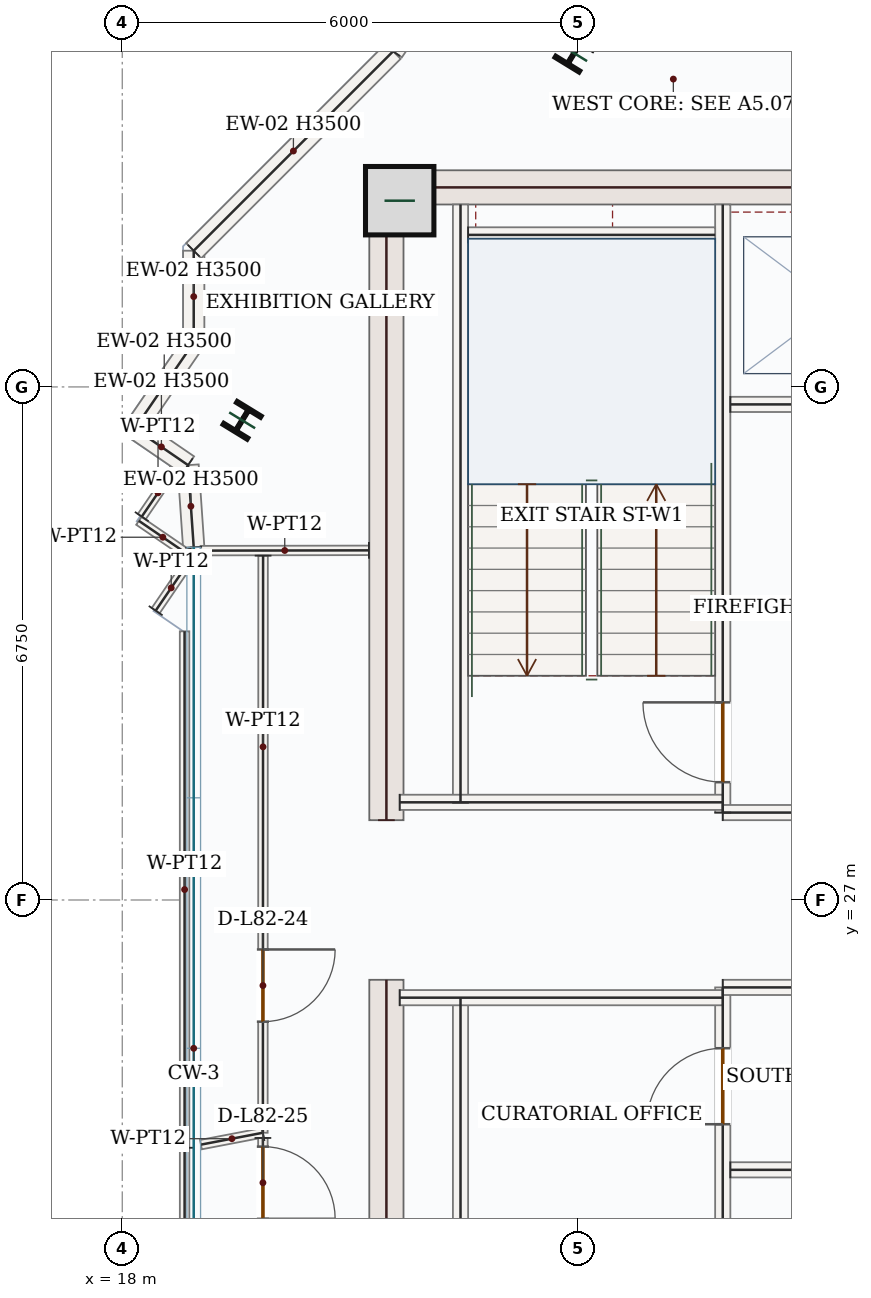
"""IFC4 building model, lengths in metres.
Left out: names, types, materials, properties, quantities, classifications, styles, units other than length and angle.
Written with IfcOpenShell. Run it as: python <this file> out.ifc"""

import sys

from ifc_helpers import new_model, si_unit, direction, frame, frame_2d, origin, origin_2d, place, context, subcontext, project, spatial, rectangle, i_section, extrude, source, transform, mapped, element, fill, save


model = new_model("IFC4")
c1 = context("Model", 3, precision=1e-05, world=origin(), true_north=direction((0.0, 1.0)))
c2 = subcontext(c1, "Body", "Model", "MODEL_VIEW")
j1 = project(units=[si_unit("LENGTHUNIT", "METRE"), si_unit("PLANEANGLEUNIT", "RADIAN")], contexts=[c1])
p1 = place(None, origin())
s1 = spatial("IfcSite", under=j1, at=p1, CompositionType="ELEMENT")
p2 = place(p1, origin())
s2 = spatial("IfcBuilding", under=s1, at=p2, CompositionType="ELEMENT")
p3 = place(p2, frame((0.0, 0.0, 338.55)))
s3 = spatial("IfcBuildingStorey", under=s2, at=p3, CompositionType="ELEMENT", Elevation=338.55)
m1 = source(origin(), c2, "Body", "SweptSolid", [
    extrude(rectangle(XDim=8.55, YDim=0.45, at=frame_2d((4.275, 0.0))), origin(), (0.0, 0.0, 1.0), 3.5),
])
for number, where, z_axis, x_axis in (
    (1, (21.475, 17.4, 0.0), (0.0, 0.0, 1.0), (0.0, 1.0, 0.0)),
    (2, (21.475, 28.05, 0.0), (0.0, 0.0, 1.0), (0.0, 1.0, 0.0)),
):
    element("IfcWall", number, at=place(p3, frame(where, z_axis=z_axis, x_axis=x_axis)), inside=s3, PredefinedType="SHEAR", context=c2, shape_type="MappedRepresentation", body=[
        mapped(m1, transform((0.0, 0.0, 0.0), x_axis=(1.0, 0.0, 0.0), y_axis=(0.0, 1.0, 0.0), z_axis=(0.0, 0.0, 1.0), scale=1.0)),
    ])
m2 = source(origin(), c2, "Body", "SweptSolid", [
    extrude(rectangle(XDim=7.1, YDim=0.45, at=frame_2d((3.55, 0.0))), origin(), (0.0, 0.0, 1.0), 3.5),
])
p4 = place(p3, frame((21.7, 36.375, 0.0), z_axis=(0.0, 0.0, 1.0), x_axis=(1.0, 0.0, 0.0)))
e3 = element("IfcWall", 3, at=p4, inside=s3, PredefinedType="SHEAR", context=c2, shape_type="MappedRepresentation", body=[
    mapped(m2, transform((0.0, 0.0, 0.0), x_axis=(1.0, 0.0, 0.0), y_axis=(0.0, 1.0, 0.0), z_axis=(0.0, 0.0, 1.0), scale=1.0)),
])
m3 = source(origin(), c2, "Body", "SweptSolid", [
    extrude(rectangle(XDim=0.9, YDim=0.9, at=origin_2d()), origin(), (0.0, 0.0, 1.0), 3.75),
])
p5 = place(p3, frame((21.65, 36.2, 0.0), z_axis=(0.0, 0.0, 1.0), x_axis=(1.0, 0.0, 0.0)))
e4 = element("IfcColumn", 4, at=p5, inside=s3, PredefinedType="COLUMN", context=c2, shape_type="MappedRepresentation", body=[
    mapped(m3, transform((0.0, 0.0, 0.0), x_axis=(1.0, 0.0, 0.0), y_axis=(0.0, 1.0, 0.0), z_axis=(0.0, 0.0, 1.0), scale=1.0)),
])
m4 = source(origin(), c2, "Body", "SweptSolid", [
    extrude(i_section(OverallWidth=0.369, OverallDepth=0.356, WebThickness=0.011, FlangeThickness=0.018, FilletRadius=0.018, at=origin_2d()), origin(), (0.0, 0.0, 1.0), 3.75),
])
for number, where, z_axis, x_axis in (
    (5, (23.945, 38.141, 0.0), (0.0, 0.0, 1.0), (-0.853, 0.522, 0.0)),
    (6, (19.577, 33.311, 0.0), (0.0, 0.0, 1.0), (-0.853, 0.522, 0.0)),
):
    element("IfcColumn", number, at=place(p3, frame(where, z_axis=z_axis, x_axis=x_axis)), inside=s3, PredefinedType="COLUMN", context=c2, shape_type="MappedRepresentation", body=[
        mapped(m4, transform((0.0, 0.0, 0.0), x_axis=(1.0, 0.0, 0.0), y_axis=(0.0, 1.0, 0.0), z_axis=(0.0, 0.0, 1.0), scale=1.0)),
    ])
m5 = source(origin(), c2, "Body", "SweptSolid", [
    extrude(rectangle(XDim=1.083, YDim=0.28, at=frame_2d((0.542, 0.0))), origin(), (0.0, 0.0, 1.0), 3.5),
])
p6 = place(p3, frame((18.94, 31.64, 0.0), z_axis=(0.0, 0.0, 1.0), x_axis=(-0.068717036618, 0.997636190642, 0.0)))
e7 = element("IfcWall", 7, at=p6, inside=s3, PredefinedType="SOLIDWALL", context=c2, shape_type="MappedRepresentation", body=[
    mapped(m5, transform((0.0, 0.0, 0.0), x_axis=(1.0, 0.0, 0.0), y_axis=(0.0, 1.0, 0.0), z_axis=(0.0, 0.0, 1.0), scale=1.0)),
])
m6 = source(origin(), c2, "Body", "SweptSolid", [
    extrude(rectangle(XDim=0.85, YDim=0.28, at=frame_2d((0.425, 0.0))), origin(), (0.0, 0.0, 1.0), 3.5),
])
p7 = place(p3, frame((18.865, 32.721, 0.0), z_axis=(0.0, 0.0, 1.0), x_axis=(-0.825046459993, 0.565064897913, 0.0)))
e8 = element("IfcWall", 8, at=p7, inside=s3, PredefinedType="SOLIDWALL", context=c2, shape_type="MappedRepresentation", body=[
    mapped(m6, transform((0.0, 0.0, 0.0), x_axis=(1.0, 0.0, 0.0), y_axis=(0.0, 1.0, 0.0), z_axis=(0.0, 0.0, 1.0), scale=1.0)),
])
m7 = source(origin(), c2, "Body", "SweptSolid", [
    extrude(rectangle(XDim=1.373, YDim=0.28, at=frame_2d((0.687, 0.0))), origin(), (0.0, 0.0, 1.0), 3.5),
])
p8 = place(p3, frame((18.164, 33.201, 0.0), z_axis=(0.0, 0.0, 1.0), x_axis=(0.564875120833, 0.825176404088, 0.0)))
e9 = element("IfcWall", 9, at=p8, inside=s3, PredefinedType="SOLIDWALL", context=c2, shape_type="MappedRepresentation", body=[
    mapped(m7, transform((0.0, 0.0, 0.0), x_axis=(1.0, 0.0, 0.0), y_axis=(0.0, 1.0, 0.0), z_axis=(0.0, 0.0, 1.0), scale=1.0)),
])
m8 = source(origin(), c2, "Body", "SweptSolid", [
    extrude(rectangle(XDim=1.208, YDim=0.28, at=frame_2d((0.604, 0.0))), origin(), (0.0, 0.0, 1.0), 3.5),
])
p9 = place(p3, frame((18.94, 34.334, 0.0), z_axis=(0.0, 0.0, 1.0), x_axis=(0.0, 1.0, 0.0)))
e10 = element("IfcWall", 10, at=p9, inside=s3, PredefinedType="SOLIDWALL", context=c2, shape_type="MappedRepresentation", body=[
    mapped(m8, transform((0.0, 0.0, 0.0), x_axis=(1.0, 0.0, 0.0), y_axis=(0.0, 1.0, 0.0), z_axis=(0.0, 0.0, 1.0), scale=1.0)),
])
m9 = source(origin(), c2, "Body", "SweptSolid", [
    extrude(rectangle(XDim=3.709, YDim=0.28, at=frame_2d((1.855, 0.0))), origin(), (0.0, 0.0, 1.0), 3.5),
])
p10 = place(p3, frame((18.94, 35.542, 0.0), z_axis=(0.0, 0.0, 1.0), x_axis=(0.707106781187, 0.707106781187, 0.0)))
e11 = element("IfcWall", 11, at=p10, inside=s3, PredefinedType="SOLIDWALL", context=c2, shape_type="MappedRepresentation", body=[
    mapped(m9, transform((0.0, 0.0, 0.0), x_axis=(1.0, 0.0, 0.0), y_axis=(0.0, 1.0, 0.0), z_axis=(0.0, 0.0, 1.0), scale=1.0)),
])
p11 = place(p3, frame((21.563, 38.165, 0.0), z_axis=(0.0, 0.0, 1.0), x_axis=(0.564961879511, 0.825117006672, 0.0)))
e12 = element("IfcWall", 12, at=p11, inside=s3, PredefinedType="SOLIDWALL", context=c2, shape_type="SweptSolid", body=[
    extrude(rectangle(XDim=3.904, YDim=0.28, at=frame_2d((1.952, 0.0))), origin(), (0.0, 0.0, 1.0), 3.5),
])
p12 = place(p11, frame((1.202, 0.0, 0.85)))
e13 = element("IfcOpeningElement", 13, at=p12, cuts=e12, PredefinedType="OPENING", context=c2, shape_type="SweptSolid", body=[
    extrude(rectangle(XDim=1.5, YDim=1.5, at=frame_2d((0.75, 0.75))), frame((0.0, 0.15, 0.0), z_axis=(0.0, -1.0, 0.0), x_axis=(1.0, 0.0, 0.0)), (0.0, 0.0, 1.0), 0.3),
])
m10 = source(origin(), c2, "Body", "SweptSolid", [
    extrude(rectangle(XDim=7.87, YDim=0.2, at=frame_2d((3.935, 0.0))), origin(), (0.0, 0.0, 1.0), 3.5),
])
for number, where, z_axis, x_axis in (
    (14, (22.45, 17.85, 0.0), (0.0, 0.0, 1.0), (0.0, 1.0, 0.0)),
    (15, (22.45, 28.28, 0.0), (0.0, 0.0, 1.0), (0.0, 1.0, 0.0)),
):
    element("IfcWall", number, at=place(p3, frame(where, z_axis=z_axis, x_axis=x_axis)), inside=s3, PredefinedType="SOLIDWALL", context=c2, shape_type="MappedRepresentation", body=[
        mapped(m10, transform((0.0, 0.0, 0.0), x_axis=(1.0, 0.0, 0.0), y_axis=(0.0, 1.0, 0.0), z_axis=(0.0, 0.0, 1.0), scale=1.0)),
    ])
p13 = place(p3, frame((25.9, 17.85, 0.0), z_axis=(0.0, 0.0, 1.0), x_axis=(0.0, 1.0, 0.0)))
e16 = element("IfcWall", 16, at=p13, inside=s3, PredefinedType="SOLIDWALL", context=c2, shape_type="SweptSolid", body=[
    extrude(rectangle(XDim=8.0, YDim=0.2, at=frame_2d((4.0, 0.0))), origin(), (0.0, 0.0, 1.0), 3.5),
])
p14 = place(p13, frame((6.2, 0.0, 0.0)))
e17 = element("IfcOpeningElement", 17, at=p14, cuts=e16, PredefinedType="OPENING", context=c2, shape_type="SweptSolid", body=[
    extrude(rectangle(XDim=1.0, YDim=2.15, at=frame_2d((0.5, 1.075))), frame((0.0, 0.11, 0.0), z_axis=(0.0, -1.0, 0.0), x_axis=(1.0, 0.0, 0.0)), (0.0, 0.0, 1.0), 0.22),
])
p15 = place(p13, frame((0.6, 0.0, 0.0)))
e18 = element("IfcOpeningElement", 18, at=p15, cuts=e16, PredefinedType="OPENING", context=c2, shape_type="SweptSolid", body=[
    extrude(rectangle(XDim=0.88, YDim=2.1, at=frame_2d((0.44, 1.05))), frame((0.0, 0.11, 0.0), z_axis=(0.0, -1.0, 0.0), x_axis=(1.0, 0.0, 0.0)), (0.0, 0.0, 1.0), 0.22),
])
p16 = place(p3, frame((25.9, 28.15, 0.0), z_axis=(0.0, 0.0, 1.0), x_axis=(0.0, 1.0, 0.0)))
e19 = element("IfcWall", 19, at=p16, inside=s3, PredefinedType="SOLIDWALL", context=c2, shape_type="SweptSolid", body=[
    extrude(rectangle(XDim=8.0, YDim=0.2, at=frame_2d((4.0, 0.0))), origin(), (0.0, 0.0, 1.0), 3.5),
])
p17 = place(p16, frame((0.4, 0.0, 0.0)))
e20 = element("IfcOpeningElement", 20, at=p17, cuts=e19, PredefinedType="OPENING", context=c2, shape_type="SweptSolid", body=[
    extrude(rectangle(XDim=1.05, YDim=2.15, at=frame_2d((0.525, 1.075))), frame((0.0, 0.11, 0.0), z_axis=(0.0, -1.0, 0.0), x_axis=(1.0, 0.0, 0.0)), (0.0, 0.0, 1.0), 0.22),
])
m11 = source(origin(), c2, "Body", "SweptSolid", [
    extrude(rectangle(XDim=4.25, YDim=0.2, at=frame_2d((2.125, 0.0))), origin(), (0.0, 0.0, 1.0), 3.5),
])
p18 = place(p3, frame((21.65, 25.715, 0.0), z_axis=(0.0, 0.0, 1.0), x_axis=(1.0, 0.0, 0.0)))
e21 = element("IfcWall", 21, at=p18, inside=s3, PredefinedType="SOLIDWALL", context=c2, shape_type="MappedRepresentation", body=[
    mapped(m11, transform((0.0, 0.0, 0.0), x_axis=(1.0, 0.0, 0.0), y_axis=(0.0, 1.0, 0.0), z_axis=(0.0, 0.0, 1.0), scale=1.0)),
])
m12 = source(origin(), c2, "Body", "SweptSolid", [
    extrude(rectangle(XDim=3.0, YDim=0.2, at=frame_2d((1.5, 0.0))), origin(), (0.0, 0.0, 1.0), 3.5),
])
p19 = place(p3, frame((25.9, 25.85, 0.0), z_axis=(0.0, 0.0, 1.0), x_axis=(1.0, 0.0, 0.0)))
e22 = element("IfcWall", 22, at=p19, inside=s3, PredefinedType="SOLIDWALL", context=c2, shape_type="MappedRepresentation", body=[
    mapped(m12, transform((0.0, 0.0, 0.0), x_axis=(1.0, 0.0, 0.0), y_axis=(0.0, 1.0, 0.0), z_axis=(0.0, 0.0, 1.0), scale=1.0)),
])
p20 = place(p3, frame((21.65, 28.285, 0.0), z_axis=(0.0, 0.0, 1.0), x_axis=(1.0, 0.0, 0.0)))
e23 = element("IfcWall", 23, at=p20, inside=s3, PredefinedType="SOLIDWALL", context=c2, shape_type="MappedRepresentation", body=[
    mapped(m11, transform((0.0, 0.0, 0.0), x_axis=(1.0, 0.0, 0.0), y_axis=(0.0, 1.0, 0.0), z_axis=(0.0, 0.0, 1.0), scale=1.0)),
])
p21 = place(p3, frame((25.9, 28.15, 0.0), z_axis=(0.0, 0.0, 1.0), x_axis=(1.0, 0.0, 0.0)))
e24 = element("IfcWall", 24, at=p21, inside=s3, PredefinedType="SOLIDWALL", context=c2, shape_type="MappedRepresentation", body=[
    mapped(m12, transform((0.0, 0.0, 0.0), x_axis=(1.0, 0.0, 0.0), y_axis=(0.0, 1.0, 0.0), z_axis=(0.0, 0.0, 1.0), scale=1.0)),
])
m13 = source(origin(), c2, "Body", "SweptSolid", [
    extrude(rectangle(XDim=3.25, YDim=0.2, at=frame_2d((1.625, 0.0))), origin(), (0.0, 0.0, 1.0), 3.5),
])
p22 = place(p3, frame((22.55, 35.75, 0.0), z_axis=(0.0, 0.0, 1.0), x_axis=(1.0, 0.0, 0.0)))
e25 = element("IfcWall", 25, at=p22, inside=s3, PredefinedType="SOLIDWALL", context=c2, shape_type="MappedRepresentation", body=[
    mapped(m13, transform((0.0, 0.0, 0.0), x_axis=(1.0, 0.0, 0.0), y_axis=(0.0, 1.0, 0.0), z_axis=(0.0, 0.0, 1.0), scale=1.0)),
])
p23 = place(p3, frame((26.0, 33.52, 0.0), z_axis=(0.0, 0.0, 1.0), x_axis=(1.0, 0.0, 0.0)))
e26 = element("IfcWall", 26, at=p23, inside=s3, PredefinedType="SOLIDWALL", context=c2, shape_type="SweptSolid", body=[
    extrude(rectangle(XDim=2.75, YDim=0.2, at=frame_2d((1.375, 0.0))), origin(), (0.0, 0.0, 1.0), 3.5),
])
p24 = place(p23, frame((0.82, 0.0, 0.0)))
e27 = element("IfcOpeningElement", 27, at=p24, cuts=e26, PredefinedType="OPENING", context=c2, shape_type="SweptSolid", body=[
    extrude(rectangle(XDim=1.1, YDim=2.15, at=frame_2d((0.55, 1.075))), frame((0.0, 0.11, 0.0), z_axis=(0.0, -1.0, 0.0), x_axis=(1.0, 0.0, 0.0)), (0.0, 0.0, 1.0), 0.22),
])
m14 = source(origin(), c2, "Body", "SweptSolid", [
    extrude(rectangle(XDim=2.75, YDim=0.2, at=frame_2d((1.375, 0.0))), origin(), (0.0, 0.0, 1.0), 3.5),
])
p25 = place(p3, frame((26.0, 23.45, 0.0), z_axis=(0.0, 0.0, 1.0), x_axis=(1.0, 0.0, 0.0)))
e28 = element("IfcWall", 28, at=p25, inside=s3, PredefinedType="SOLIDWALL", context=c2, shape_type="MappedRepresentation", body=[
    mapped(m14, transform((0.0, 0.0, 0.0), x_axis=(1.0, 0.0, 0.0), y_axis=(0.0, 1.0, 0.0), z_axis=(0.0, 0.0, 1.0), scale=1.0)),
])
m15 = source(origin(), c2, "Body", "SweptSolid", [
    extrude(rectangle(XDim=2.215, YDim=0.125, at=frame_2d((1.107, 0.0))), origin(), (0.0, 0.0, 1.0), 3.5),
])
p26 = place(p3, frame((21.245, 31.6, 0.0), z_axis=(0.0, 0.0, 1.0), x_axis=(-0.999998633374, -0.001653254657, 0.0)))
e29 = element("IfcWall", 29, at=p26, inside=s3, PredefinedType="PARTITIONING", context=c2, shape_type="MappedRepresentation", body=[
    mapped(m15, transform((0.0, 0.0, 0.0), x_axis=(1.0, 0.0, 0.0), y_axis=(0.0, 1.0, 0.0), z_axis=(0.0, 0.0, 1.0), scale=1.0)),
])
p27 = place(p3, frame((19.853, 31.53, 0.0), z_axis=(0.0, 0.0, 1.0), x_axis=(-0.000321574412, -0.999999948295, 0.0)))
e30 = element("IfcWall", 30, at=p27, inside=s3, PredefinedType="PARTITIONING", context=c2, shape_type="SweptSolid", body=[
    extrude(rectangle(XDim=7.592, YDim=0.125, at=frame_2d((3.796, 0.0))), origin(), (0.0, 0.0, 1.0), 3.5),
])
p28 = place(p27, frame((5.181, 0.0, 0.0)))
e31 = element("IfcOpeningElement", 31, at=p28, cuts=e30, PredefinedType="OPENING", context=c2, shape_type="SweptSolid", body=[
    extrude(rectangle(XDim=0.95, YDim=2.15, at=frame_2d((0.475, 1.075))), frame((0.0, 0.073, 0.0), z_axis=(0.0, -1.0, 0.0), x_axis=(1.0, 0.0, 0.0)), (0.0, 0.0, 1.0), 0.145),
])
m16 = source(origin(), c2, "Body", "SweptSolid", [
    extrude(rectangle(XDim=0.83, YDim=0.125, at=frame_2d((0.415, 0.0))), origin(), (0.0, 0.0, 1.0), 3.5),
])
p29 = place(p3, frame((19.85, 23.938, 0.0), z_axis=(0.0, 0.0, 1.0), x_axis=(-0.98205677528, -0.188585498189, 0.0)))
e32 = element("IfcWall", 32, at=p29, inside=s3, PredefinedType="PARTITIONING", context=c2, shape_type="MappedRepresentation", body=[
    mapped(m16, transform((0.0, 0.0, 0.0), x_axis=(1.0, 0.0, 0.0), y_axis=(0.0, 1.0, 0.0), z_axis=(0.0, 0.0, 1.0), scale=1.0)),
])
m17 = source(origin(), c2, "Body", "SweptSolid", [
    extrude(rectangle(XDim=6.795, YDim=0.125, at=frame_2d((3.397, 0.0))), origin(), (0.0, 0.0, 1.0), 3.5),
])
p30 = place(p3, frame((18.82, 23.74, 0.0), z_axis=(0.0, 0.0, 1.0), x_axis=(-7.1862312e-05, 0.999999997418, 0.0)))
e33 = element("IfcWall", 33, at=p30, inside=s3, PredefinedType="PARTITIONING", context=c2, shape_type="MappedRepresentation", body=[
    mapped(m17, transform((0.0, 0.0, 0.0), x_axis=(1.0, 0.0, 0.0), y_axis=(0.0, 1.0, 0.0), z_axis=(0.0, 0.0, 1.0), scale=1.0)),
])
m18 = source(origin(), c2, "Body", "SweptSolid", [
    extrude(rectangle(XDim=0.725, YDim=0.125, at=frame_2d((0.362, 0.0))), origin(), (0.0, 0.0, 1.0), 3.5),
])
p31 = place(p3, frame((18.44, 30.807, 0.0), z_axis=(0.0, 0.0, 1.0), x_axis=(0.563221841823, 0.826305728464, 0.0)))
e34 = element("IfcWall", 34, at=p31, inside=s3, PredefinedType="PARTITIONING", context=c2, shape_type="MappedRepresentation", body=[
    mapped(m18, transform((0.0, 0.0, 0.0), x_axis=(1.0, 0.0, 0.0), y_axis=(0.0, 1.0, 0.0), z_axis=(0.0, 0.0, 1.0), scale=1.0)),
])
m19 = source(origin(), c2, "Body", "SweptSolid", [
    extrude(rectangle(XDim=0.764, YDim=0.125, at=frame_2d((0.382, 0.0))), origin(), (0.0, 0.0, 1.0), 3.5),
])
p32 = place(p3, frame((18.849, 31.557, 0.0), z_axis=(0.0, 0.0, 1.0), x_axis=(-0.82520537731, 0.564832794071, 0.0)))
e35 = element("IfcWall", 35, at=p32, inside=s3, PredefinedType="PARTITIONING", context=c2, shape_type="MappedRepresentation", body=[
    mapped(m19, transform((0.0, 0.0, 0.0), x_axis=(1.0, 0.0, 0.0), y_axis=(0.0, 1.0, 0.0), z_axis=(0.0, 0.0, 1.0), scale=1.0)),
])
m20 = source(origin(), c2, "Body", "SweptSolid", [
    extrude(rectangle(XDim=0.757, YDim=0.125, at=frame_2d((0.379, 0.0))), origin(), (0.0, 0.0, 1.0), 3.5),
])
p33 = place(p3, frame((18.257, 32.044, 0.0), z_axis=(0.0, 0.0, 1.0), x_axis=(0.564406554972, 0.825496965896, 0.0)))
e36 = element("IfcWall", 36, at=p33, inside=s3, PredefinedType="PARTITIONING", context=c2, shape_type="MappedRepresentation", body=[
    mapped(m20, transform((0.0, 0.0, 0.0), x_axis=(1.0, 0.0, 0.0), y_axis=(0.0, 1.0, 0.0), z_axis=(0.0, 0.0, 1.0), scale=1.0)),
])
p34 = place(p3, frame((19.85, 23.869, 0.0), z_axis=(0.0, 0.0, 1.0), x_axis=(0.000665004009, -0.999999778885, 0.0)))
e37 = element("IfcWall", 37, at=p34, inside=s3, PredefinedType="PARTITIONING", context=c2, shape_type="SweptSolid", body=[
    extrude(rectangle(XDim=1.469, YDim=0.125, at=frame_2d((0.734, 0.0))), origin(), (0.0, 0.0, 1.0), 3.5),
])
p35 = place(p34, frame((0.114, 0.0, 0.0)))
e38 = element("IfcOpeningElement", 38, at=p35, cuts=e37, PredefinedType="OPENING", context=c2, shape_type="SweptSolid", body=[
    extrude(rectangle(XDim=0.95, YDim=2.15, at=frame_2d((0.475, 1.075))), frame((0.0, 0.073, 0.0), z_axis=(0.0, -1.0, 0.0), x_axis=(1.0, 0.0, 0.0)), (0.0, 0.0, 1.0), 0.145),
])
m21 = source(origin(), c2, "Body", "SweptSolid", [
    extrude(rectangle(XDim=5.332, YDim=0.125, at=frame_2d((2.666, 0.0))), origin(), (0.0, 0.0, 1.0), 3.5),
])
p36 = place(p3, frame((18.82, 18.408, 0.0), z_axis=(0.0, 0.0, 1.0), x_axis=(0.0, 1.0, 0.0)))
e39 = element("IfcWall", 39, at=p36, inside=s3, PredefinedType="PARTITIONING", context=c2, shape_type="MappedRepresentation", body=[
    mapped(m21, transform((0.0, 0.0, 0.0), x_axis=(1.0, 0.0, 0.0), y_axis=(0.0, 1.0, 0.0), z_axis=(0.0, 0.0, 1.0), scale=1.0)),
])
m22 = source(origin(), c2, "Body", "SweptSolid", [
    extrude(rectangle(XDim=1.05, YDim=2.15, at=frame_2d((0.525, 1.075))), frame((0.0, 0.025, 0.0), z_axis=(0.0, -1.0, 0.0), x_axis=(1.0, 0.0, 0.0)), (0.0, 0.0, 1.0), 0.05),
])
p37 = place(p17, origin())
e40 = element("IfcDoor", 40, at=p37, inside=s3, OperationType="SINGLE_SWING_RIGHT", PredefinedType="DOOR", context=c2, shape_type="MappedRepresentation", body=[
    mapped(m22, transform((0.0, 0.0, 0.0), x_axis=(1.0, 0.0, 0.0), y_axis=(0.0, 1.0, 0.0), z_axis=(0.0, 0.0, 1.0), scale=1.0)),
])
fill(e20, e40)
m23 = source(origin(), c2, "Body", "SweptSolid", [
    extrude(rectangle(XDim=1.0, YDim=2.15, at=frame_2d((0.5, 1.075))), frame((0.0, 0.025, 0.0), z_axis=(0.0, -1.0, 0.0), x_axis=(1.0, 0.0, 0.0)), (0.0, 0.0, 1.0), 0.05),
])
p38 = place(p14, origin())
e41 = element("IfcDoor", 41, at=p38, inside=s3, OperationType="SINGLE_SWING_LEFT", PredefinedType="DOOR", context=c2, shape_type="MappedRepresentation", body=[
    mapped(m23, transform((0.0, 0.0, 0.0), x_axis=(1.0, 0.0, 0.0), y_axis=(0.0, 1.0, 0.0), z_axis=(0.0, 0.0, 1.0), scale=1.0)),
])
fill(e17, e41)
m24 = source(origin(), c2, "Body", "SweptSolid", [
    extrude(rectangle(XDim=0.95, YDim=2.15, at=frame_2d((0.475, 1.075))), frame((0.0, 0.025, 0.0), z_axis=(0.0, -1.0, 0.0), x_axis=(1.0, 0.0, 0.0)), (0.0, 0.0, 1.0), 0.05),
])
p39 = place(p28, origin())
e42 = element("IfcDoor", 42, at=p39, inside=s3, OperationType="SINGLE_SWING_LEFT", PredefinedType="DOOR", context=c2, shape_type="MappedRepresentation", body=[
    mapped(m24, transform((0.0, 0.0, 0.0), x_axis=(1.0, 0.0, 0.0), y_axis=(0.0, 1.0, 0.0), z_axis=(0.0, 0.0, 1.0), scale=1.0)),
])
fill(e31, e42)
p40 = place(p35, origin())
e43 = element("IfcDoor", 43, at=p40, inside=s3, OperationType="SINGLE_SWING_RIGHT", PredefinedType="DOOR", context=c2, shape_type="MappedRepresentation", body=[
    mapped(m24, transform((0.0, 0.0, 0.0), x_axis=(1.0, 0.0, 0.0), y_axis=(0.0, 1.0, 0.0), z_axis=(0.0, 0.0, 1.0), scale=1.0)),
])
fill(e38, e43)
save(model, sys.argv[1])
